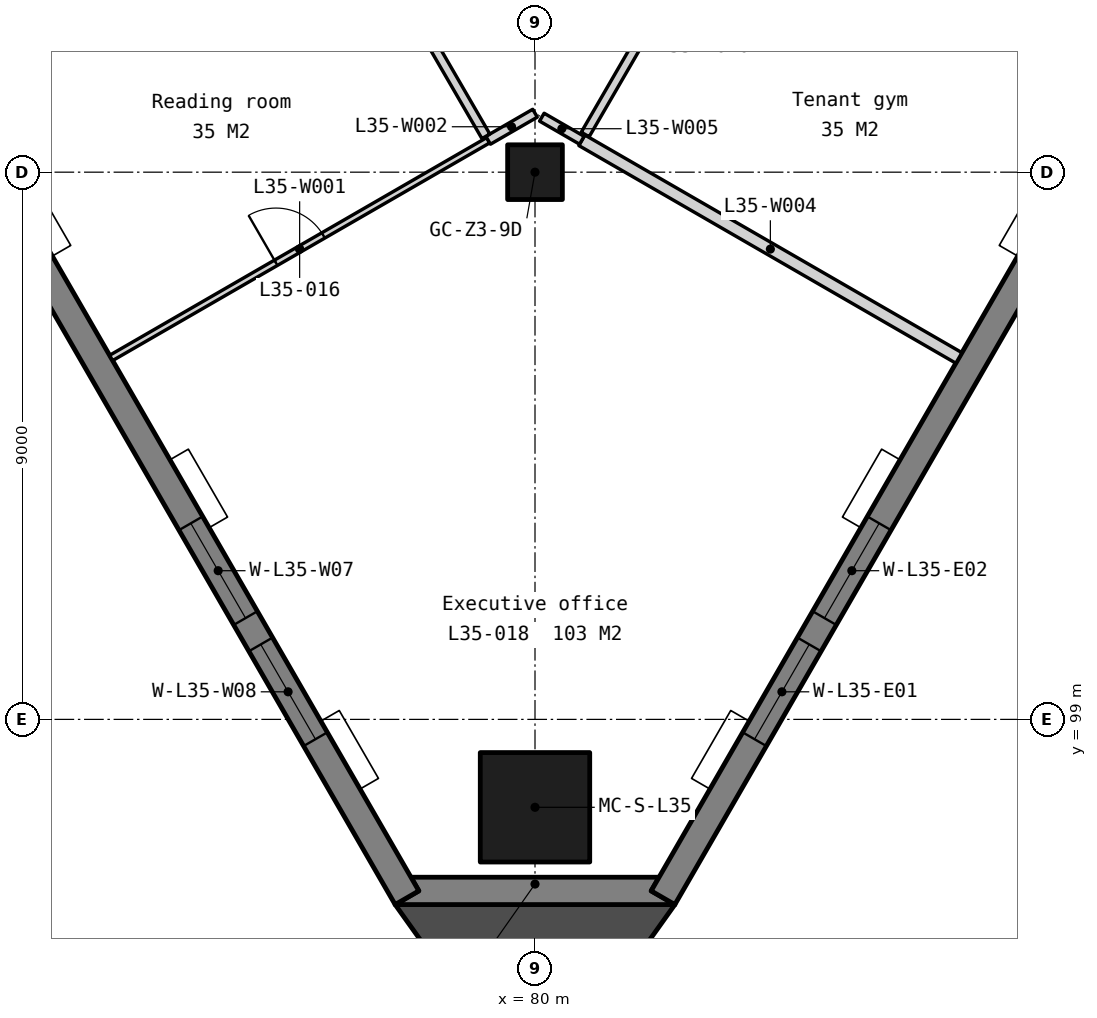
"""IFC4 building model, lengths in metres.
Left out: names, types, materials, properties, quantities, classifications, styles, units other than length and angle.
Written with IfcOpenShell. Run it as: python <this file> out.ifc"""

import sys

from ifc_helpers import new_model, si_unit, direction, frame, frame_2d, origin, origin_2d, place, context, subcontext, project, spatial, polyline, rectangle, outline, extrude, element, fill, save


model = new_model("IFC4")
c1 = context("Model", 3, precision=1e-05, world=origin(), true_north=direction((0.0, 1.0)))
c2 = subcontext(c1, "Body", "Model", "MODEL_VIEW")
j1 = project(units=[si_unit("LENGTHUNIT", "METRE"), si_unit("PLANEANGLEUNIT", "RADIAN")], contexts=[c1])
p1 = place(None, origin())
s1 = spatial("IfcSite", under=j1, at=p1, CompositionType="ELEMENT")
p2 = place(p1, origin())
s2 = spatial("IfcBuilding", under=s1, at=p2, CompositionType="ELEMENT")
p3 = place(p2, frame((0.0, 0.0, 140.3)))
s3 = spatial("IfcBuildingStorey", under=s2, at=p3, CompositionType="ELEMENT", Elevation=140.3)
p4 = place(p3, frame((80.0, 108.0, 0.0), z_axis=(0.0, 0.0, 1.0), x_axis=(1.0, 0.0, 0.0)))
e1 = element("IfcColumn", 1, at=p4, inside=s3, PredefinedType="COLUMN", context=c2, shape_type="SweptSolid", body=[
    extrude(rectangle(XDim=0.9, YDim=0.9, at=origin_2d()), origin(), (0.0, 0.0, 1.0), 3.9),
])
p5 = place(p3, frame((80.0, 97.554, 0.0), z_axis=(0.0, 0.0, 1.0), x_axis=(1.0, 0.0, 0.0)))
e2 = element("IfcColumn", 2, at=p5, inside=s3, PredefinedType="COLUMN", context=c2, shape_type="SweptSolid", body=[
    extrude(rectangle(XDim=1.8, YDim=1.8, at=origin_2d()), origin(), (0.0, 0.0, 1.0), 3.9),
])
p6 = place(p3, frame((0.0, 0.0, -0.15)))
e3 = element("IfcWall", 3, at=p6, inside=s3, PredefinedType="SOLIDWALL", context=c2, shape_type="SweptSolid", body=[
    extrude(outline(polyline([(77.7, 95.954), (78.09, 96.179), (77.96, 96.404), (82.04, 96.404), (81.91, 96.179), (82.3, 95.954), (77.7, 95.954)])), origin(), (0.0, 0.0, 1.0), 3.9),
])
p7 = place(p3, frame((57.652, 131.129, -0.15), z_axis=(0.0, 0.0, 1.0), x_axis=(0.499997369791, -0.866026922331, 0.0)))
e4 = element("IfcWall", 4, at=p7, inside=s3, PredefinedType="SOLIDWALL", context=c2, shape_type="SweptSolid", body=[
    extrude(outline(polyline([(40.486, 0.0), (40.486, 3.9), (0.0, 3.9), (0.0, 0.0), (40.486, 0.0)])), frame((0.0, 0.225, 0.0), z_axis=(0.0, -1.0, 0.0), x_axis=(1.0, 0.0, 0.0)), (0.0, 0.0, 1.0), 0.45),
])
p8 = place(p7, frame((3.011, 0.0, 0.95)))
e5 = element("IfcOpeningElement", 5, at=p8, cuts=e4, PredefinedType="OPENING", context=c2, shape_type="SweptSolid", body=[
    extrude(rectangle(XDim=1.8, YDim=2.2, at=frame_2d((0.9, 1.1))), frame((0.0, 0.235, 0.0), z_axis=(0.0, -1.0, 0.0), x_axis=(1.0, 0.0, 0.0)), (0.0, 0.0, 1.0), 0.47),
])
p9 = place(p7, frame((5.311, 0.0, 0.95)))
e6 = element("IfcOpeningElement", 6, at=p9, cuts=e4, PredefinedType="OPENING", context=c2, shape_type="SweptSolid", body=[
    extrude(rectangle(XDim=1.8, YDim=2.2, at=frame_2d((0.9, 1.1))), frame((0.0, 0.235, 0.0), z_axis=(0.0, -1.0, 0.0), x_axis=(1.0, 0.0, 0.0)), (0.0, 0.0, 1.0), 0.47),
])
p10 = place(p7, frame((13.132, 0.0, 0.95)))
e7 = element("IfcOpeningElement", 7, at=p10, cuts=e4, PredefinedType="OPENING", context=c2, shape_type="SweptSolid", body=[
    extrude(rectangle(XDim=1.8, YDim=2.2, at=frame_2d((0.9, 1.1))), frame((0.0, 0.235, 0.0), z_axis=(0.0, -1.0, 0.0), x_axis=(1.0, 0.0, 0.0)), (0.0, 0.0, 1.0), 0.47),
])
p11 = place(p7, frame((15.432, 0.0, 0.95)))
e8 = element("IfcOpeningElement", 8, at=p11, cuts=e4, PredefinedType="OPENING", context=c2, shape_type="SweptSolid", body=[
    extrude(rectangle(XDim=1.8, YDim=2.2, at=frame_2d((0.9, 1.1))), frame((0.0, 0.235, 0.0), z_axis=(0.0, -1.0, 0.0), x_axis=(1.0, 0.0, 0.0)), (0.0, 0.0, 1.0), 0.47),
])
p12 = place(p7, frame((23.254, 0.0, 0.95)))
e9 = element("IfcOpeningElement", 9, at=p12, cuts=e4, PredefinedType="OPENING", context=c2, shape_type="SweptSolid", body=[
    extrude(rectangle(XDim=1.8, YDim=2.2, at=frame_2d((0.9, 1.1))), frame((0.0, 0.235, 0.0), z_axis=(0.0, -1.0, 0.0), x_axis=(1.0, 0.0, 0.0)), (0.0, 0.0, 1.0), 0.47),
])
p13 = place(p7, frame((25.554, 0.0, 0.95)))
e10 = element("IfcOpeningElement", 10, at=p13, cuts=e4, PredefinedType="OPENING", context=c2, shape_type="SweptSolid", body=[
    extrude(rectangle(XDim=1.8, YDim=2.2, at=frame_2d((0.9, 1.1))), frame((0.0, 0.235, 0.0), z_axis=(0.0, -1.0, 0.0), x_axis=(1.0, 0.0, 0.0)), (0.0, 0.0, 1.0), 0.47),
])
p14 = place(p7, frame((33.375, 0.0, 0.95)))
e11 = element("IfcOpeningElement", 11, at=p14, cuts=e4, PredefinedType="OPENING", context=c2, shape_type="SweptSolid", body=[
    extrude(rectangle(XDim=1.8, YDim=2.2, at=frame_2d((0.9, 1.1))), frame((0.0, 0.235, 0.0), z_axis=(0.0, -1.0, 0.0), x_axis=(1.0, 0.0, 0.0)), (0.0, 0.0, 1.0), 0.47),
])
p15 = place(p7, frame((35.675, 0.0, 0.95)))
e12 = element("IfcOpeningElement", 12, at=p15, cuts=e4, PredefinedType="OPENING", context=c2, shape_type="SweptSolid", body=[
    extrude(rectangle(XDim=1.8, YDim=2.2, at=frame_2d((0.9, 1.1))), frame((0.0, 0.235, 0.0), z_axis=(0.0, -1.0, 0.0), x_axis=(1.0, 0.0, 0.0)), (0.0, 0.0, 1.0), 0.47),
])
p16 = place(p3, frame((82.105, 96.067, -0.15), z_axis=(0.0, 0.0, 1.0), x_axis=(0.499997369791, 0.866026922331, 0.0)))
e13 = element("IfcWall", 13, at=p16, inside=s3, PredefinedType="SOLIDWALL", context=c2, shape_type="SweptSolid", body=[
    extrude(outline(polyline([(40.486, 0.0), (40.486, 3.9), (0.0, 3.9), (0.0, 0.0), (40.486, 0.0)])), frame((0.0, 0.225, 0.0), z_axis=(0.0, -1.0, 0.0), x_axis=(1.0, 0.0, 0.0)), (0.0, 0.0, 1.0), 0.45),
])
p17 = place(p16, frame((3.011, 0.0, 0.95)))
e14 = element("IfcOpeningElement", 14, at=p17, cuts=e13, PredefinedType="OPENING", context=c2, shape_type="SweptSolid", body=[
    extrude(rectangle(XDim=1.8, YDim=2.2, at=frame_2d((0.9, 1.1))), frame((0.0, 0.235, 0.0), z_axis=(0.0, -1.0, 0.0), x_axis=(1.0, 0.0, 0.0)), (0.0, 0.0, 1.0), 0.47),
])
p18 = place(p16, frame((5.311, 0.0, 0.95)))
e15 = element("IfcOpeningElement", 15, at=p18, cuts=e13, PredefinedType="OPENING", context=c2, shape_type="SweptSolid", body=[
    extrude(rectangle(XDim=1.8, YDim=2.2, at=frame_2d((0.9, 1.1))), frame((0.0, 0.235, 0.0), z_axis=(0.0, -1.0, 0.0), x_axis=(1.0, 0.0, 0.0)), (0.0, 0.0, 1.0), 0.47),
])
p19 = place(p16, frame((13.132, 0.0, 0.95)))
e16 = element("IfcOpeningElement", 16, at=p19, cuts=e13, PredefinedType="OPENING", context=c2, shape_type="SweptSolid", body=[
    extrude(rectangle(XDim=1.8, YDim=2.2, at=frame_2d((0.9, 1.1))), frame((0.0, 0.235, 0.0), z_axis=(0.0, -1.0, 0.0), x_axis=(1.0, 0.0, 0.0)), (0.0, 0.0, 1.0), 0.47),
])
p20 = place(p16, frame((15.432, 0.0, 0.95)))
e17 = element("IfcOpeningElement", 17, at=p20, cuts=e13, PredefinedType="OPENING", context=c2, shape_type="SweptSolid", body=[
    extrude(rectangle(XDim=1.8, YDim=2.2, at=frame_2d((0.9, 1.1))), frame((0.0, 0.235, 0.0), z_axis=(0.0, -1.0, 0.0), x_axis=(1.0, 0.0, 0.0)), (0.0, 0.0, 1.0), 0.47),
])
p21 = place(p16, frame((23.254, 0.0, 0.95)))
e18 = element("IfcOpeningElement", 18, at=p21, cuts=e13, PredefinedType="OPENING", context=c2, shape_type="SweptSolid", body=[
    extrude(rectangle(XDim=1.8, YDim=2.2, at=frame_2d((0.9, 1.1))), frame((0.0, 0.235, 0.0), z_axis=(0.0, -1.0, 0.0), x_axis=(1.0, 0.0, 0.0)), (0.0, 0.0, 1.0), 0.47),
])
p22 = place(p16, frame((25.554, 0.0, 0.95)))
e19 = element("IfcOpeningElement", 19, at=p22, cuts=e13, PredefinedType="OPENING", context=c2, shape_type="SweptSolid", body=[
    extrude(rectangle(XDim=1.8, YDim=2.2, at=frame_2d((0.9, 1.1))), frame((0.0, 0.235, 0.0), z_axis=(0.0, -1.0, 0.0), x_axis=(1.0, 0.0, 0.0)), (0.0, 0.0, 1.0), 0.47),
])
p23 = place(p16, frame((33.375, 0.0, 0.95)))
e20 = element("IfcOpeningElement", 20, at=p23, cuts=e13, PredefinedType="OPENING", context=c2, shape_type="SweptSolid", body=[
    extrude(rectangle(XDim=1.8, YDim=2.2, at=frame_2d((0.9, 1.1))), frame((0.0, 0.235, 0.0), z_axis=(0.0, -1.0, 0.0), x_axis=(1.0, 0.0, 0.0)), (0.0, 0.0, 1.0), 0.47),
])
p24 = place(p16, frame((35.675, 0.0, 0.95)))
e21 = element("IfcOpeningElement", 21, at=p24, cuts=e13, PredefinedType="OPENING", context=c2, shape_type="SweptSolid", body=[
    extrude(rectangle(XDim=1.8, YDim=2.2, at=frame_2d((0.9, 1.1))), frame((0.0, 0.235, 0.0), z_axis=(0.0, -1.0, 0.0), x_axis=(1.0, 0.0, 0.0)), (0.0, 0.0, 1.0), 0.47),
])
p25 = place(p3, frame((0.0, 0.0, -0.15)))
e22 = element("IfcWall", 22, at=p25, inside=s3, PredefinedType="SOLIDWALL", context=c2, shape_type="SweptSolid", body=[
    extrude(outline(polyline([(77.7, 95.954), (80.0, 92.733), (82.3, 95.954), (77.7, 95.954)])), origin(), (0.0, 0.0, 1.0), 3.9),
])
p26 = place(p3, frame((73.029, 104.945, 0.0), z_axis=(0.0, 0.0, 1.0), x_axis=(0.866033408367, 0.4999861354, 0.0)))
e23 = element("IfcWall", 23, at=p26, inside=s3, PredefinedType="PARTITIONING", context=c2, shape_type="SweptSolid", body=[
    extrude(rectangle(XDim=7.16, YDim=0.1, at=frame_2d((3.58, 0.0))), origin(), (0.0, 0.0, 1.0), 3.75),
])
p27 = place(p26, frame((3.13, 0.0, 0.0)))
e24 = element("IfcOpeningElement", 24, at=p27, cuts=e23, PredefinedType="OPENING", context=c2, shape_type="SweptSolid", body=[
    extrude(rectangle(XDim=0.9, YDim=2.1, at=frame_2d((0.45, 1.05))), frame((0.0, 0.06, 0.0), z_axis=(0.0, -1.0, 0.0), x_axis=(1.0, 0.0, 0.0)), (0.0, 0.0, 1.0), 0.12),
])
p28 = place(p3, frame((79.23, 108.525, 0.0), z_axis=(0.0, 0.0, 1.0), x_axis=(0.865970738743, 0.500094670678, 0.0)))
e25 = element("IfcWall", 25, at=p28, inside=s3, PredefinedType="PARTITIONING", context=c2, shape_type="SweptSolid", body=[
    extrude(rectangle(XDim=0.889, YDim=0.15, at=frame_2d((0.445, 0.0))), origin(), (0.0, 0.0, 1.0), 3.75),
])
p29 = place(p3, frame((76.691, 112.903, 0.0), z_axis=(0.0, 0.0, 1.0), x_axis=(0.501707830428, -0.8650371396, 0.0)))
e26 = element("IfcWall", 26, at=p29, inside=s3, PredefinedType="PARTITIONING", context=c2, shape_type="SweptSolid", body=[
    extrude(rectangle(XDim=4.986, YDim=0.15, at=frame_2d((2.493, 0.0))), origin(), (0.0, 0.0, 1.0), 3.75),
])
p30 = place(p29, frame((1.993, 0.0, 0.0)))
e27 = element("IfcOpeningElement", 27, at=p30, cuts=e26, PredefinedType="OPENING", context=c2, shape_type="SweptSolid", body=[
    extrude(rectangle(XDim=1.0, YDim=2.1, at=frame_2d((0.5, 1.05))), frame((0.0, 0.085, 0.0), z_axis=(0.0, -1.0, 0.0), x_axis=(1.0, 0.0, 0.0)), (0.0, 0.0, 1.0), 0.17),
])
p31 = place(p3, frame((80.77, 108.525, 0.0), z_axis=(0.0, 0.0, 1.0), x_axis=(0.866033408367, -0.4999861354, 0.0)))
e28 = element("IfcWall", 28, at=p31, inside=s3, PredefinedType="PARTITIONING", context=c2, shape_type="SweptSolid", body=[
    extrude(rectangle(XDim=7.16, YDim=0.2, at=frame_2d((3.58, 0.0))), origin(), (0.0, 0.0, 1.0), 3.75),
])
p32 = place(p3, frame((80.113, 108.905, 0.0), z_axis=(0.0, 0.0, 1.0), x_axis=(0.865939322839, -0.50014906694, 0.0)))
e29 = element("IfcWall", 29, at=p32, inside=s3, PredefinedType="PARTITIONING", context=c2, shape_type="SweptSolid", body=[
    extrude(rectangle(XDim=0.76, YDim=0.15, at=frame_2d((0.38, 0.0))), origin(), (0.0, 0.0, 1.0), 3.75),
])
p33 = place(p3, frame((70.499, 109.327, 0.0), z_axis=(0.0, 0.0, 1.0), x_axis=(0.866010067511, 0.500026562264, 0.0)))
e30 = element("IfcWall", 30, at=p33, inside=s3, PredefinedType="PARTITIONING", context=c2, shape_type="SweptSolid", body=[
    extrude(rectangle(XDim=7.065, YDim=0.2, at=frame_2d((3.532, 0.0))), origin(), (0.0, 0.0, 1.0), 3.75),
])
p34 = place(p3, frame((83.374, 112.865, 0.0), z_axis=(0.0, 0.0, 1.0), x_axis=(0.866021813296, -0.500006218857, 0.0)))
e31 = element("IfcWall", 31, at=p34, inside=s3, PredefinedType="PARTITIONING", context=c2, shape_type="SweptSolid", body=[
    extrude(rectangle(XDim=7.075, YDim=0.1, at=frame_2d((3.538, 0.0))), origin(), (0.0, 0.0, 1.0), 3.75),
])
p35 = place(p34, frame((3.087, 0.0, 0.0)))
e32 = element("IfcOpeningElement", 32, at=p35, cuts=e31, PredefinedType="OPENING", context=c2, shape_type="SweptSolid", body=[
    extrude(rectangle(XDim=0.9, YDim=2.1, at=frame_2d((0.45, 1.05))), frame((0.0, 0.06, 0.0), z_axis=(0.0, -1.0, 0.0), x_axis=(1.0, 0.0, 0.0)), (0.0, 0.0, 1.0), 0.12),
])
p36 = place(p3, frame((80.825, 108.62, 0.0), z_axis=(0.0, 0.0, 1.0), x_axis=(0.501704805906, 0.865038893768, 0.0)))
e33 = element("IfcWall", 33, at=p36, inside=s3, PredefinedType="PARTITIONING", context=c2, shape_type="SweptSolid", body=[
    extrude(rectangle(XDim=4.951, YDim=0.15, at=frame_2d((2.476, 0.0))), origin(), (0.0, 0.0, 1.0), 3.75),
])
p37 = place(p36, frame((1.975, 0.0, 0.0)))
e34 = element("IfcOpeningElement", 34, at=p37, cuts=e33, PredefinedType="OPENING", context=c2, shape_type="SweptSolid", body=[
    extrude(rectangle(XDim=1.0, YDim=2.1, at=frame_2d((0.5, 1.05))), frame((0.0, 0.085, 0.0), z_axis=(0.0, -1.0, 0.0), x_axis=(1.0, 0.0, 0.0)), (0.0, 0.0, 1.0), 0.17),
])
p38 = place(p14, origin())
e35 = element("IfcWindow", 35, at=p38, inside=s3, PartitioningType="SINGLE_PANEL", PredefinedType="WINDOW", context=c2, shape_type="SweptSolid", body=[
    extrude(rectangle(XDim=1.8, YDim=2.2, at=frame_2d((0.9, 1.1))), frame((0.0, 0.03, 0.0), z_axis=(0.0, -1.0, 0.0), x_axis=(1.0, 0.0, 0.0)), (0.0, 0.0, 1.0), 0.06),
])
fill(e11, e35)
p39 = place(p15, origin())
e36 = element("IfcWindow", 36, at=p39, inside=s3, PartitioningType="SINGLE_PANEL", PredefinedType="WINDOW", context=c2, shape_type="SweptSolid", body=[
    extrude(rectangle(XDim=1.8, YDim=2.2, at=frame_2d((0.9, 1.1))), frame((0.0, 0.03, 0.0), z_axis=(0.0, -1.0, 0.0), x_axis=(1.0, 0.0, 0.0)), (0.0, 0.0, 1.0), 0.06),
])
fill(e12, e36)
p40 = place(p17, origin())
e37 = element("IfcWindow", 37, at=p40, inside=s3, PartitioningType="SINGLE_PANEL", PredefinedType="WINDOW", context=c2, shape_type="SweptSolid", body=[
    extrude(rectangle(XDim=1.8, YDim=2.2, at=frame_2d((0.9, 1.1))), frame((0.0, 0.03, 0.0), z_axis=(0.0, -1.0, 0.0), x_axis=(1.0, 0.0, 0.0)), (0.0, 0.0, 1.0), 0.06),
])
fill(e14, e37)
p41 = place(p18, origin())
e38 = element("IfcWindow", 38, at=p41, inside=s3, PartitioningType="SINGLE_PANEL", PredefinedType="WINDOW", context=c2, shape_type="SweptSolid", body=[
    extrude(rectangle(XDim=1.8, YDim=2.2, at=frame_2d((0.9, 1.1))), frame((0.0, 0.03, 0.0), z_axis=(0.0, -1.0, 0.0), x_axis=(1.0, 0.0, 0.0)), (0.0, 0.0, 1.0), 0.06),
])
fill(e15, e38)
p42 = place(p27, origin())
e39 = element("IfcDoor", 39, at=p42, inside=s3, OperationType="SINGLE_SWING_LEFT", PredefinedType="DOOR", context=c2, shape_type="SweptSolid", body=[
    extrude(rectangle(XDim=0.9, YDim=2.1, at=frame_2d((0.45, 1.05))), frame((0.0, 0.025, 0.0), z_axis=(0.0, -1.0, 0.0), x_axis=(1.0, 0.0, 0.0)), (0.0, 0.0, 1.0), 0.05),
])
fill(e24, e39)
save(model, sys.argv[1])
